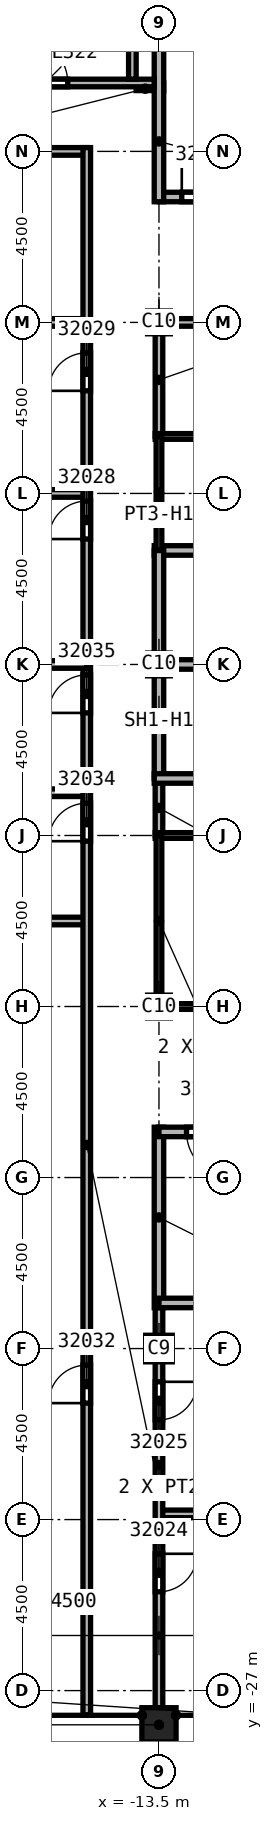
"""IFC4 building model, lengths in metres.
Left out: names, types, materials, properties, quantities, classifications, styles, units other than length and angle.
Written with IfcOpenShell. Run it as: python <this file> out.ifc"""

import sys

from ifc_helpers import new_model, si_unit, direction, frame, frame_2d, origin, origin_2d, place, context, subcontext, project, spatial, rectangle, extrude, element, fill, save


model = new_model("IFC4")
c1 = context("Model", 3, precision=1e-05, world=origin(), true_north=direction((0.0, 1.0)))
c2 = subcontext(c1, "Body", "Model", "MODEL_VIEW")
j1 = project(units=[si_unit("LENGTHUNIT", "METRE"), si_unit("PLANEANGLEUNIT", "RADIAN")], contexts=[c1])
p1 = place(None, origin())
s1 = spatial("IfcSite", under=j1, at=p1, CompositionType="ELEMENT")
p2 = place(p1, origin())
s2 = spatial("IfcBuilding", under=s1, at=p2, CompositionType="ELEMENT")
p3 = place(p2, frame((0.0, 0.0, 356.0)))
s3 = spatial("IfcBuildingStorey", under=s2, at=p3, CompositionType="ELEMENT", Elevation=356.0)
p4 = place(p3, frame((-13.5, -18.0, 0.0), z_axis=(0.0, 0.0, 1.0), x_axis=(1.0, 0.0, 0.0)))
e1 = element("IfcColumn", 1, at=p4, inside=s3, PredefinedType="COLUMN", context=c2, shape_type="SweptSolid", body=[
    extrude(rectangle(XDim=0.7, YDim=0.7, at=origin_2d()), origin(), (0.0, 0.0, 1.0), 4.6),
])
for number, where, z_axis, x_axis in (
    (2, (-13.5, 0.0, 0.0), (0.0, 0.0, 1.0), (1.0, 0.0, 0.0)),
    (3, (-13.5, 9.0, 0.0), (0.0, 0.0, 1.0), (1.0, 0.0, 0.0)),
    (4, (-13.5, -9.0, 0.0), (0.0, 0.0, 1.0), (1.0, 0.0, 0.0)),
):
    element("IfcColumn", number, at=place(p3, frame(where, z_axis=z_axis, x_axis=x_axis)), inside=s3, PredefinedType="COLUMN", context=c2, shape_type="SweptSolid", body=[
        extrude(rectangle(XDim=0.6, YDim=0.6, at=origin_2d()), origin(), (0.0, 0.0, 1.0), 4.6),
    ])
p5 = place(p3, frame((-13.5, -27.9, 0.0), z_axis=(0.0, 0.0, 1.0), x_axis=(1.0, 0.0, 0.0)))
e5 = element("IfcColumn", 5, at=p5, inside=s3, PredefinedType="COLUMN", context=c2, shape_type="SweptSolid", body=[
    extrude(rectangle(XDim=0.9, YDim=0.9, at=origin_2d()), origin(), (0.0, 0.0, 1.0), 4.6),
])
for number, where, z_axis, x_axis in (
    (6, (-26.736, -6.75, 0.0), (0.0, 0.0, 1.0), (1.0, 0.0, 0.0)),
    (7, (-26.736, -3.375, 0.0), (0.0, 0.0, 1.0), (1.0, 0.0, 0.0)),
):
    element("IfcWall", number, at=place(p3, frame(where, z_axis=z_axis, x_axis=x_axis)), inside=s3, PredefinedType="PARTITIONING", context=c2, shape_type="SweptSolid", body=[
        extrude(rectangle(XDim=11.336, YDim=0.2, at=frame_2d((5.668, 0.0))), origin(), (0.0, 0.0, 1.0), 4.15),
    ])
for number, where, z_axis, x_axis in (
    (8, (-26.55, 4.5, 0.0), (0.0, 0.0, 1.0), (1.0, 0.0, 0.0)),
    (9, (-26.55, 9.0, 0.0), (0.0, 0.0, 1.0), (1.0, 0.0, 0.0)),
):
    element("IfcWall", number, at=place(p3, frame(where, z_axis=z_axis, x_axis=x_axis)), inside=s3, PredefinedType="PARTITIONING", context=c2, shape_type="SweptSolid", body=[
        extrude(rectangle(XDim=11.15, YDim=0.2, at=frame_2d((5.575, 0.0))), origin(), (0.0, 0.0, 1.0), 4.15),
    ])
p6 = place(p3, frame((-15.4, 13.5, 0.0), z_axis=(0.0, 0.0, 1.0), x_axis=(-1.0, 0.0, 0.0)))
e10 = element("IfcWall", 10, at=p6, inside=s3, PredefinedType="PARTITIONING", context=c2, shape_type="SweptSolid", body=[
    extrude(rectangle(XDim=6.6, YDim=0.2, at=frame_2d((3.3, 0.0))), origin(), (0.0, 0.0, 1.0), 4.15),
])
p7 = place(p6, frame((2.2, 0.0, 0.0)))
e11 = element("IfcOpeningElement", 11, at=p7, cuts=e10, PredefinedType="OPENING", context=c2, shape_type="SweptSolid", body=[
    extrude(rectangle(XDim=1.0, YDim=2.1, at=frame_2d((0.5, 1.05))), frame((0.0, 0.1, 0.0), z_axis=(0.0, -1.0, 0.0), x_axis=(1.0, 0.0, 0.0)), (0.0, 0.0, 1.0), 0.2),
])
p8 = place(p3, frame((-15.4, -27.636, 0.0), z_axis=(0.0, 0.0, 1.0), x_axis=(0.0, 1.0, 0.0)))
e12 = element("IfcWall", 12, at=p8, inside=s3, PredefinedType="PARTITIONING", context=c2, shape_type="SweptSolid", body=[
    extrude(rectangle(XDim=41.236, YDim=0.2, at=frame_2d((20.618, 0.0))), origin(), (0.0, 0.0, 1.0), 4.15),
])
p9 = place(p8, frame((30.936, 0.0, 0.0)))
e13 = element("IfcOpeningElement", 13, at=p9, cuts=e12, PredefinedType="OPENING", context=c2, shape_type="SweptSolid", body=[
    extrude(rectangle(XDim=1.0, YDim=2.1, at=frame_2d((0.5, 1.05))), frame((0.0, 0.1, 0.0), z_axis=(0.0, -1.0, 0.0), x_axis=(1.0, 0.0, 0.0)), (0.0, 0.0, 1.0), 0.2),
])
p10 = place(p8, frame((34.836, 0.0, 0.0)))
e14 = element("IfcOpeningElement", 14, at=p10, cuts=e12, PredefinedType="OPENING", context=c2, shape_type="SweptSolid", body=[
    extrude(rectangle(XDim=1.0, YDim=2.1, at=frame_2d((0.5, 1.05))), frame((0.0, 0.1, 0.0), z_axis=(0.0, -1.0, 0.0), x_axis=(1.0, 0.0, 0.0)), (0.0, 0.0, 1.0), 0.2),
])
p11 = place(p8, frame((8.2, 0.0, 0.0)))
e15 = element("IfcOpeningElement", 15, at=p11, cuts=e12, PredefinedType="OPENING", context=c2, shape_type="SweptSolid", body=[
    extrude(rectangle(XDim=1.0, YDim=2.1, at=frame_2d((0.5, 1.05))), frame((0.0, 0.1, 0.0), z_axis=(0.0, -1.0, 0.0), x_axis=(1.0, 0.0, 0.0)), (0.0, 0.0, 1.0), 0.2),
])
p12 = place(p8, frame((22.986, 0.0, 0.0)))
e16 = element("IfcOpeningElement", 16, at=p12, cuts=e12, PredefinedType="OPENING", context=c2, shape_type="SweptSolid", body=[
    extrude(rectangle(XDim=1.0, YDim=2.1, at=frame_2d((0.5, 1.05))), frame((0.0, 0.1, 0.0), z_axis=(0.0, -1.0, 0.0), x_axis=(1.0, 0.0, 0.0)), (0.0, 0.0, 1.0), 0.2),
])
p13 = place(p8, frame((26.361, 0.0, 0.0)))
e17 = element("IfcOpeningElement", 17, at=p13, cuts=e12, PredefinedType="OPENING", context=c2, shape_type="SweptSolid", body=[
    extrude(rectangle(XDim=1.0, YDim=2.1, at=frame_2d((0.5, 1.05))), frame((0.0, 0.1, 0.0), z_axis=(0.0, -1.0, 0.0), x_axis=(1.0, 0.0, 0.0)), (0.0, 0.0, 1.0), 0.2),
])
p14 = place(p3, frame((-15.4, 0.0, 0.0), z_axis=(0.0, 0.0, 1.0), x_axis=(-1.0, 0.0, 0.0)))
e18 = element("IfcWall", 18, at=p14, inside=s3, PredefinedType="PARTITIONING", context=c2, shape_type="SweptSolid", body=[
    extrude(rectangle(XDim=11.15, YDim=0.2, at=frame_2d((5.575, 0.0))), origin(), (0.0, 0.0, 1.0), 4.15),
])
p15 = place(p3, frame((-14.1, 15.2, 0.0), z_axis=(0.0, 0.0, 1.0), x_axis=(1.0, 0.0, 0.0)))
e19 = element("IfcWall", 19, at=p15, inside=s3, PredefinedType="PARTITIONING", context=c2, shape_type="SweptSolid", body=[
    extrude(rectangle(XDim=0.725, YDim=0.2, at=frame_2d((0.363, 0.0))), origin(), (0.0, 0.0, 1.0), 4.15),
])
p16 = place(p3, frame((-13.5, -22.35, 0.0), z_axis=(0.0, 0.0, 1.0), x_axis=(1.0, 0.0, 0.0)))
e20 = element("IfcWall", 20, at=p16, inside=s3, PredefinedType="PARTITIONING", context=c2, shape_type="SweptSolid", body=[
    extrude(rectangle(XDim=10.5, YDim=0.2, at=frame_2d((5.25, 0.0))), origin(), (0.0, 0.0, 1.0), 4.15),
])
p17 = place(p3, frame((-13.5, -16.675, 0.0), z_axis=(0.0, 0.0, 1.0), x_axis=(0.0, -1.0, 0.0)))
e21 = element("IfcWall", 21, at=p17, inside=s3, PredefinedType="PARTITIONING", context=c2, shape_type="SweptSolid", body=[
    extrude(rectangle(XDim=10.775, YDim=0.2, at=frame_2d((5.387, 0.0))), origin(), (0.0, 0.0, 1.0), 4.15),
])
p18 = place(p17, frame((6.725, 0.0, 0.0)))
e22 = element("IfcOpeningElement", 22, at=p18, cuts=e21, PredefinedType="OPENING", context=c2, shape_type="SweptSolid", body=[
    extrude(rectangle(XDim=1.0, YDim=2.1, at=frame_2d((0.5, 1.05))), frame((0.0, 0.1, 0.0), z_axis=(0.0, -1.0, 0.0), x_axis=(1.0, 0.0, 0.0)), (0.0, 0.0, 1.0), 0.2),
])
p19 = place(p17, frame((2.2, 0.0, 0.0)))
e23 = element("IfcOpeningElement", 23, at=p19, cuts=e21, PredefinedType="OPENING", context=c2, shape_type="SweptSolid", body=[
    extrude(rectangle(XDim=1.0, YDim=2.1, at=frame_2d((0.5, 1.05))), frame((0.0, 0.1, 0.0), z_axis=(0.0, -1.0, 0.0), x_axis=(1.0, 0.0, 0.0)), (0.0, 0.0, 1.0), 0.2),
])
p20 = place(p3, frame((-13.5, -4.5, 0.0), z_axis=(0.0, 0.0, 1.0), x_axis=(0.0, 1.0, 0.0)))
e24 = element("IfcWall", 24, at=p20, inside=s3, PredefinedType="SOLIDWALL", context=c2, shape_type="SweptSolid", body=[
    extrude(rectangle(XDim=1.5, YDim=0.2, at=frame_2d((0.75, 0.0))), origin(), (0.0, 0.0, 1.0), 3.838),
])
p21 = place(p3, frame((-13.5, 6.0, 0.0), z_axis=(0.0, 0.0, 1.0), x_axis=(0.0, 1.0, 0.0)))
e25 = element("IfcWall", 25, at=p21, inside=s3, PredefinedType="SOLIDWALL", context=c2, shape_type="SweptSolid", body=[
    extrude(rectangle(XDim=3.1, YDim=0.2, at=frame_2d((1.55, 0.0))), origin(), (0.0, 0.0, 1.0), 3.838),
])
p22 = place(p3, frame((-13.5, 9.0, 0.0), z_axis=(0.0, 0.0, 1.0), x_axis=(1.0, 0.0, 0.0)))
e26 = element("IfcWall", 26, at=p22, inside=s3, PredefinedType="SOLIDWALL", context=c2, shape_type="SweptSolid", body=[
    extrude(rectangle(XDim=3.0, YDim=0.2, at=frame_2d((1.5, 0.0))), origin(), (0.0, 0.0, 1.0), 3.838),
])
p23 = place(p3, frame((-13.625, 0.0, 0.0), z_axis=(0.0, 0.0, 1.0), x_axis=(1.0, 0.0, 0.0)))
e27 = element("IfcWall", 27, at=p23, inside=s3, PredefinedType="SOLIDWALL", context=c2, shape_type="SweptSolid", body=[
    extrude(rectangle(XDim=3.125, YDim=0.25, at=frame_2d((1.562, 0.0))), origin(), (0.0, 0.0, 1.0), 4.15),
])
p24 = place(p3, frame((-13.625, 3.0, 0.0), z_axis=(0.0, 0.0, 1.0), x_axis=(1.0, 0.0, 0.0)))
e28 = element("IfcWall", 28, at=p24, inside=s3, PredefinedType="SOLIDWALL", context=c2, shape_type="SweptSolid", body=[
    extrude(rectangle(XDim=6.125, YDim=0.25, at=frame_2d((3.062, 0.0))), origin(), (0.0, 0.0, 1.0), 4.15),
])
p25 = place(p24, frame((4.75, 0.0, 0.0)))
e29 = element("IfcOpeningElement", 29, at=p25, cuts=e28, PredefinedType="OPENING", context=c2, shape_type="SweptSolid", body=[
    extrude(rectangle(XDim=1.1, YDim=2.1, at=frame_2d((0.55, 1.05))), frame((0.0, 0.125, 0.0), z_axis=(0.0, -1.0, 0.0), x_axis=(1.0, 0.0, 0.0)), (0.0, 0.0, 1.0), 0.25),
])
p26 = place(p3, frame((-13.5, -3.0, 0.0), z_axis=(0.0, 0.0, 1.0), x_axis=(0.0, 1.0, 0.0)))
e30 = element("IfcWall", 30, at=p26, inside=s3, PredefinedType="SOLIDWALL", context=c2, shape_type="SweptSolid", body=[
    extrude(rectangle(XDim=6.0, YDim=0.25, at=frame_2d((3.0, 0.0))), origin(), (0.0, 0.0, 1.0), 3.838),
])
p27 = place(p3, frame((-13.625, -3.0, 0.0), z_axis=(0.0, 0.0, 1.0), x_axis=(1.0, 0.0, 0.0)))
e31 = element("IfcWall", 31, at=p27, inside=s3, PredefinedType="SOLIDWALL", context=c2, shape_type="SweptSolid", body=[
    extrude(rectangle(XDim=6.125, YDim=0.25, at=frame_2d((3.062, 0.0))), origin(), (0.0, 0.0, 1.0), 4.15),
])
p28 = place(p27, frame((4.75, 0.0, 0.0)))
e32 = element("IfcOpeningElement", 32, at=p28, cuts=e31, PredefinedType="OPENING", context=c2, shape_type="SweptSolid", body=[
    extrude(rectangle(XDim=1.1, YDim=2.1, at=frame_2d((0.55, 1.05))), frame((0.0, 0.125, 0.0), z_axis=(0.0, -1.0, 0.0), x_axis=(1.0, 0.0, 0.0)), (0.0, 0.0, 1.0), 0.25),
])
p29 = place(p3, frame((-13.5, -12.175, 0.0), z_axis=(0.0, 0.0, 1.0), x_axis=(0.0, -1.0, 0.0)))
e33 = element("IfcWall", 33, at=p29, inside=s3, PredefinedType="SOLIDWALL", context=c2, shape_type="SweptSolid", body=[
    extrude(rectangle(XDim=4.75, YDim=0.25, at=frame_2d((2.375, 0.0))), origin(), (0.0, 0.0, 1.0), 4.15),
])
p30 = place(p3, frame((-13.5, 12.3, 0.0), z_axis=(0.0, 0.0, 1.0), x_axis=(1.0, 0.0, 0.0)))
e34 = element("IfcWall", 34, at=p30, inside=s3, PredefinedType="SOLIDWALL", context=c2, shape_type="SweptSolid", body=[
    extrude(rectangle(XDim=9.125, YDim=0.25, at=frame_2d((4.562, 0.0))), origin(), (0.0, 0.0, 1.0), 4.15),
])
p31 = place(p30, frame((0.6, 0.0, 0.0)))
e35 = element("IfcOpeningElement", 35, at=p31, cuts=e34, PredefinedType="OPENING", context=c2, shape_type="SweptSolid", body=[
    extrude(rectangle(XDim=1.2, YDim=2.1, at=frame_2d((0.6, 1.05))), frame((0.0, 0.125, 0.0), z_axis=(0.0, -1.0, 0.0), x_axis=(1.0, 0.0, 0.0)), (0.0, 0.0, 1.0), 0.25),
])
p32 = place(p3, frame((-13.5, 12.175, 0.0), z_axis=(0.0, 0.0, 1.0), x_axis=(0.0, 1.0, 0.0)))
e36 = element("IfcWall", 36, at=p32, inside=s3, PredefinedType="SOLIDWALL", context=c2, shape_type="SweptSolid", body=[
    extrude(rectangle(XDim=4.75, YDim=0.25, at=frame_2d((2.375, 0.0))), origin(), (0.0, 0.0, 1.0), 4.15),
])
p33 = place(p3, frame((-4.4, -16.8, 0.0), z_axis=(0.0, 0.0, 1.0), x_axis=(-1.0, 0.0, 0.0)))
e37 = element("IfcWall", 37, at=p33, inside=s3, PredefinedType="SOLIDWALL", context=c2, shape_type="SweptSolid", body=[
    extrude(rectangle(XDim=9.1, YDim=0.25, at=frame_2d((4.55, 0.0))), origin(), (0.0, 0.0, 1.0), 4.15),
])
p34 = place(p3, frame((-4.375, -12.3, 0.0), z_axis=(0.0, 0.0, 1.0), x_axis=(-1.0, 0.0, 0.0)))
e38 = element("IfcWall", 38, at=p34, inside=s3, PredefinedType="SOLIDWALL", context=c2, shape_type="SweptSolid", body=[
    extrude(rectangle(XDim=9.125, YDim=0.25, at=frame_2d((4.562, 0.0))), origin(), (0.0, 0.0, 1.0), 4.15),
])
p35 = place(p34, frame((7.2, 0.0, 0.0)))
e39 = element("IfcOpeningElement", 39, at=p35, cuts=e38, PredefinedType="OPENING", context=c2, shape_type="SweptSolid", body=[
    extrude(rectangle(XDim=1.2, YDim=2.1, at=frame_2d((0.6, 1.05))), frame((0.0, 0.125, 0.0), z_axis=(0.0, -1.0, 0.0), x_axis=(1.0, 0.0, 0.0)), (0.0, 0.0, 1.0), 0.25),
])
for number, where, z_axis, x_axis in (
    (40, (-13.6, -4.5, 0.0), (0.0, 0.0, 1.0), (1.0, 0.0, 0.0)),
    (41, (-13.6, 6.0, 0.0), (0.0, 0.0, 1.0), (1.0, 0.0, 0.0)),
):
    element("IfcWall", number, at=place(p3, frame(where, z_axis=z_axis, x_axis=x_axis)), inside=s3, PredefinedType="PARTITIONING", context=c2, shape_type="SweptSolid", body=[
        extrude(rectangle(XDim=3.1, YDim=0.15, at=frame_2d((1.55, 0.0))), origin(), (0.0, 0.0, 1.0), 4.15),
    ])
p36 = place(p3, frame((-13.5, -9.075, 0.0), z_axis=(0.0, 0.0, 1.0), x_axis=(0.0, 1.0, 0.0)))
e42 = element("IfcWall", 42, at=p36, inside=s3, PredefinedType="PARTITIONING", context=c2, shape_type="SweptSolid", body=[
    extrude(rectangle(XDim=4.575, YDim=0.15, at=frame_2d((2.288, 0.0))), origin(), (0.0, 0.0, 1.0), 3.838),
])
for number, where, z_axis, x_axis in (
    (43, (-13.5, 3.0, 0.0), (0.0, 0.0, 1.0), (0.0, 1.0, 0.0)),
    (44, (-10.5, -9.0, 0.0), (0.0, 0.0, 1.0), (-1.0, 0.0, 0.0)),
):
    element("IfcWall", number, at=place(p3, frame(where, z_axis=z_axis, x_axis=x_axis)), inside=s3, PredefinedType="PARTITIONING", context=c2, shape_type="SweptSolid", body=[
        extrude(rectangle(XDim=3.0, YDim=0.15, at=frame_2d((1.5, 0.0))), origin(), (0.0, 0.0, 1.0), 3.838),
    ])
p37 = place(p3, frame((-21.9, 15.3, 0.0), z_axis=(0.0, 0.0, 1.0), x_axis=(1.0, 0.0, 0.0)))
e45 = element("IfcWall", 45, at=p37, inside=s3, PredefinedType="SOLIDWALL", context=c2, shape_type="SweptSolid", body=[
    extrude(rectangle(XDim=8.275, YDim=0.2, at=frame_2d((4.137, 0.0))), origin(), (0.0, 0.0, 1.0), 4.15),
])
p38 = place(p37, frame((4.8, 0.0, 0.0)))
e46 = element("IfcOpeningElement", 46, at=p38, cuts=e45, PredefinedType="OPENING", context=c2, shape_type="SweptSolid", body=[
    extrude(rectangle(XDim=1.2, YDim=2.1, at=frame_2d((0.6, 1.05))), frame((0.0, 0.1, 0.0), z_axis=(0.0, -1.0, 0.0), x_axis=(1.0, 0.0, 0.0)), (0.0, 0.0, 1.0), 0.2),
])
p39 = place(p3, frame((-14.2, 15.4, 0.0), z_axis=(0.0, 0.0, 1.0), x_axis=(0.0, 1.0, 0.0)))
e47 = element("IfcWall", 47, at=p39, inside=s3, PredefinedType="SOLIDWALL", context=c2, shape_type="SweptSolid", body=[
    extrude(rectangle(XDim=5.9, YDim=0.2, at=frame_2d((2.95, 0.0))), origin(), (0.0, 0.0, 1.0), 4.15),
])
p40 = place(p31, origin())
e48 = element("IfcDoor", 48, at=p40, inside=s3, OperationType="SINGLE_SWING_LEFT", PredefinedType="DOOR", context=c2, shape_type="SweptSolid", body=[
    extrude(rectangle(XDim=1.2, YDim=2.1, at=frame_2d((0.6, 1.05))), frame((0.0, 0.025, 0.0), z_axis=(0.0, -1.0, 0.0), x_axis=(1.0, 0.0, 0.0)), (0.0, 0.0, 1.0), 0.05),
])
fill(e35, e48)
p41 = place(p35, origin())
e49 = element("IfcDoor", 49, at=p41, inside=s3, OperationType="SINGLE_SWING_RIGHT", PredefinedType="DOOR", context=c2, shape_type="SweptSolid", body=[
    extrude(rectangle(XDim=1.2, YDim=2.1, at=frame_2d((0.6, 1.05))), frame((0.0, 0.025, 0.0), z_axis=(0.0, -1.0, 0.0), x_axis=(1.0, 0.0, 0.0)), (0.0, 0.0, 1.0), 0.05),
])
fill(e39, e49)
p42 = place(p18, origin())
e50 = element("IfcDoor", 50, at=p42, inside=s3, OperationType="SINGLE_SWING_LEFT", PredefinedType="DOOR", context=c2, shape_type="SweptSolid", body=[
    extrude(rectangle(XDim=1.0, YDim=2.1, at=frame_2d((0.5, 1.05))), frame((0.0, 0.025, 0.0), z_axis=(0.0, -1.0, 0.0), x_axis=(1.0, 0.0, 0.0)), (0.0, 0.0, 1.0), 0.05),
])
fill(e22, e50)
p43 = place(p19, origin())
e51 = element("IfcDoor", 51, at=p43, inside=s3, OperationType="SINGLE_SWING_RIGHT", PredefinedType="DOOR", context=c2, shape_type="SweptSolid", body=[
    extrude(rectangle(XDim=1.0, YDim=2.1, at=frame_2d((0.5, 1.05))), frame((0.0, 0.025, 0.0), z_axis=(0.0, -1.0, 0.0), x_axis=(1.0, 0.0, 0.0)), (0.0, 0.0, 1.0), 0.05),
])
fill(e23, e51)
p44 = place(p9, origin())
e52 = element("IfcDoor", 52, at=p44, inside=s3, OperationType="SINGLE_SWING_LEFT", PredefinedType="DOOR", context=c2, shape_type="SweptSolid", body=[
    extrude(rectangle(XDim=1.0, YDim=2.1, at=frame_2d((0.5, 1.05))), frame((0.0, 0.025, 0.0), z_axis=(0.0, -1.0, 0.0), x_axis=(1.0, 0.0, 0.0)), (0.0, 0.0, 1.0), 0.05),
])
fill(e13, e52)
p45 = place(p10, origin())
e53 = element("IfcDoor", 53, at=p45, inside=s3, OperationType="SINGLE_SWING_RIGHT", PredefinedType="DOOR", context=c2, shape_type="SweptSolid", body=[
    extrude(rectangle(XDim=1.0, YDim=2.1, at=frame_2d((0.5, 1.05))), frame((0.0, 0.025, 0.0), z_axis=(0.0, -1.0, 0.0), x_axis=(1.0, 0.0, 0.0)), (0.0, 0.0, 1.0), 0.05),
])
fill(e14, e53)
p46 = place(p11, origin())
e54 = element("IfcDoor", 54, at=p46, inside=s3, OperationType="SINGLE_SWING_LEFT", PredefinedType="DOOR", context=c2, shape_type="SweptSolid", body=[
    extrude(rectangle(XDim=1.0, YDim=2.1, at=frame_2d((0.5, 1.05))), frame((0.0, 0.025, 0.0), z_axis=(0.0, -1.0, 0.0), x_axis=(1.0, 0.0, 0.0)), (0.0, 0.0, 1.0), 0.05),
])
fill(e15, e54)
p47 = place(p12, origin())
e55 = element("IfcDoor", 55, at=p47, inside=s3, OperationType="SINGLE_SWING_LEFT", PredefinedType="DOOR", context=c2, shape_type="SweptSolid", body=[
    extrude(rectangle(XDim=1.0, YDim=2.1, at=frame_2d((0.5, 1.05))), frame((0.0, 0.025, 0.0), z_axis=(0.0, -1.0, 0.0), x_axis=(1.0, 0.0, 0.0)), (0.0, 0.0, 1.0), 0.05),
])
fill(e16, e55)
p48 = place(p13, origin())
e56 = element("IfcDoor", 56, at=p48, inside=s3, OperationType="SINGLE_SWING_RIGHT", PredefinedType="DOOR", context=c2, shape_type="SweptSolid", body=[
    extrude(rectangle(XDim=1.0, YDim=2.1, at=frame_2d((0.5, 1.05))), frame((0.0, 0.025, 0.0), z_axis=(0.0, -1.0, 0.0), x_axis=(1.0, 0.0, 0.0)), (0.0, 0.0, 1.0), 0.05),
])
fill(e17, e56)
p49 = place(p38, origin())
e57 = element("IfcDoor", 57, at=p49, inside=s3, OperationType="SINGLE_SWING_RIGHT", PredefinedType="DOOR", context=c2, shape_type="SweptSolid", body=[
    extrude(rectangle(XDim=1.2, YDim=2.1, at=frame_2d((0.6, 1.05))), frame((0.0, 0.025, 0.0), z_axis=(0.0, -1.0, 0.0), x_axis=(1.0, 0.0, 0.0)), (0.0, 0.0, 1.0), 0.05),
])
fill(e46, e57)
save(model, sys.argv[1])
